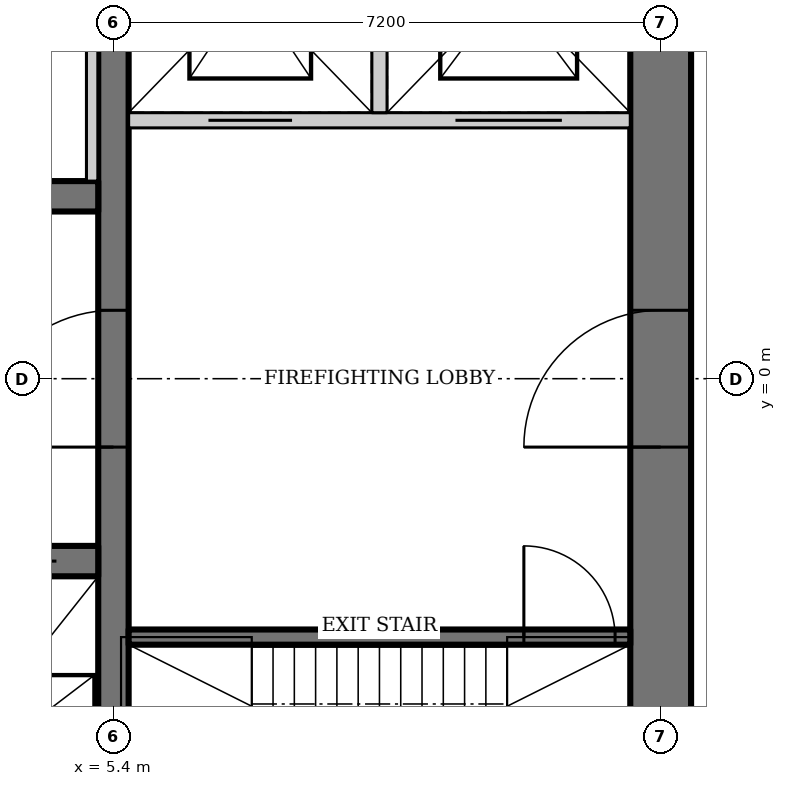
"""IFC4 building model, lengths in metres.
Left out: names, types, materials, properties, quantities, classifications, styles, units other than length and angle.
Written with IfcOpenShell. Run it as: python <this file> out.ifc"""

import sys

from ifc_helpers import new_model, si_unit, direction, frame, frame_2d, origin, place, context, subcontext, project, spatial, rectangle, extrude, element, fill, save


model = new_model("IFC4")
c1 = context("Model", 3, precision=1e-05, world=origin(), true_north=direction((0.0, 1.0)))
c2 = subcontext(c1, "Body", "Model", "MODEL_VIEW")
j1 = project(units=[si_unit("LENGTHUNIT", "METRE"), si_unit("PLANEANGLEUNIT", "RADIAN")], contexts=[c1])
p1 = place(None, origin())
s1 = spatial("IfcSite", under=j1, at=p1, CompositionType="ELEMENT")
p2 = place(p1, origin())
s2 = spatial("IfcBuilding", under=s1, at=p2, CompositionType="ELEMENT")
p3 = place(p2, frame((0.0, 0.0, 274.9)))
s3 = spatial("IfcBuildingStorey", under=s2, at=p3, CompositionType="ELEMENT", Elevation=274.9)
p4 = place(p3, frame((12.6, -11.0, 0.0), z_axis=(0.0, 0.0, 1.0), x_axis=(0.0, 1.0, 0.0)))
e1 = element("IfcWall", 1, at=p4, inside=s3, PredefinedType="SHEAR", context=c2, shape_type="SweptSolid", body=[
    extrude(rectangle(XDim=22.0, YDim=0.8, at=frame_2d((11.0, 0.0))), origin(), (0.0, 0.0, 1.0), 4.5),
])
p5 = place(p4, frame((10.1, 0.0, 0.0)))
e2 = element("IfcOpeningElement", 2, at=p5, cuts=e1, PredefinedType="OPENING", context=c2, shape_type="SweptSolid", body=[
    extrude(rectangle(XDim=1.8, YDim=2.1, at=frame_2d((0.9, 1.05))), frame((0.0, 0.41, 0.0), z_axis=(0.0, -1.0, 0.0), x_axis=(1.0, 0.0, 0.0)), (0.0, 0.0, 1.0), 0.82),
])
p6 = place(p3, frame((5.4, -6.8, 0.0), z_axis=(0.0, 0.0, 1.0), x_axis=(0.0, 1.0, 0.0)))
e3 = element("IfcWall", 3, at=p6, inside=s3, PredefinedType="SHEAR", context=c2, shape_type="SweptSolid", body=[
    extrude(rectangle(XDim=14.6, YDim=0.4, at=frame_2d((7.3, 0.0))), origin(), (0.0, 0.0, 1.0), 4.5),
])
p7 = place(p6, frame((5.9, 0.0, 0.0)))
e4 = element("IfcOpeningElement", 4, at=p7, cuts=e3, PredefinedType="OPENING", context=c2, shape_type="SweptSolid", body=[
    extrude(rectangle(XDim=1.8, YDim=2.1, at=frame_2d((0.9, 1.05))), frame((0.0, 0.21, 0.0), z_axis=(0.0, -1.0, 0.0), x_axis=(1.0, 0.0, 0.0)), (0.0, 0.0, 1.0), 0.42),
])
p8 = place(p3, frame((-5.2, -2.4, 0.0), z_axis=(0.0, 0.0, 1.0), x_axis=(1.0, 0.0, 0.0)))
e5 = element("IfcWall", 5, at=p8, inside=s3, PredefinedType="SHEAR", context=c2, shape_type="SweptSolid", body=[
    extrude(rectangle(XDim=10.4, YDim=0.4, at=frame_2d((5.2, 0.0))), origin(), (0.0, 0.0, 1.0), 4.5),
])
p9 = place(p8, frame((1.683, 0.0, 0.0)))
e6 = element("IfcOpeningElement", 6, at=p9, cuts=e5, PredefinedType="OPENING", context=c2, shape_type="SweptSolid", body=[
    extrude(rectangle(XDim=1.1, YDim=2.2, at=frame_2d((0.55, 1.1))), frame((0.0, 0.21, 0.0), z_axis=(0.0, -1.0, 0.0), x_axis=(1.0, 0.0, 0.0)), (0.0, 0.0, 1.0), 0.42),
])
p10 = place(p8, frame((5.217, 0.0, 0.0)))
e7 = element("IfcOpeningElement", 7, at=p10, cuts=e5, PredefinedType="OPENING", context=c2, shape_type="SweptSolid", body=[
    extrude(rectangle(XDim=1.1, YDim=2.2, at=frame_2d((0.55, 1.1))), frame((0.0, 0.21, 0.0), z_axis=(0.0, -1.0, 0.0), x_axis=(1.0, 0.0, 0.0)), (0.0, 0.0, 1.0), 0.42),
])
p11 = place(p8, frame((8.75, 0.0, 0.0)))
e8 = element("IfcOpeningElement", 8, at=p11, cuts=e5, PredefinedType="OPENING", context=c2, shape_type="SweptSolid", body=[
    extrude(rectangle(XDim=1.1, YDim=2.2, at=frame_2d((0.55, 1.1))), frame((0.0, 0.21, 0.0), z_axis=(0.0, -1.0, 0.0), x_axis=(1.0, 0.0, 0.0)), (0.0, 0.0, 1.0), 0.42),
])
p12 = place(p3, frame((5.2, 2.4, 0.0), z_axis=(0.0, 0.0, 1.0), x_axis=(-1.0, 0.0, 0.0)))
e9 = element("IfcWall", 9, at=p12, inside=s3, PredefinedType="SHEAR", context=c2, shape_type="SweptSolid", body=[
    extrude(rectangle(XDim=10.4, YDim=0.4, at=frame_2d((5.2, 0.0))), origin(), (0.0, 0.0, 1.0), 4.5),
])
p13 = place(p3, frame((5.6, -3.4, 0.0), z_axis=(0.0, 0.0, 1.0), x_axis=(1.0, 0.0, 0.0)))
e10 = element("IfcWall", 10, at=p13, inside=s3, PredefinedType="SHEAR", context=c2, shape_type="SweptSolid", body=[
    extrude(rectangle(XDim=6.6, YDim=0.2, at=frame_2d((3.3, 0.0))), origin(), (0.0, 0.0, 1.0), 4.5),
])
p14 = place(p13, frame((5.2, 0.0, 0.0)))
e11 = element("IfcOpeningElement", 11, at=p14, cuts=e10, PredefinedType="OPENING", context=c2, shape_type="SweptSolid", body=[
    extrude(rectangle(XDim=1.2, YDim=2.1, at=frame_2d((0.6, 1.05))), frame((0.0, 0.11, 0.0), z_axis=(0.0, -1.0, 0.0), x_axis=(1.0, 0.0, 0.0)), (0.0, 0.0, 1.0), 0.22),
])
p15 = place(p3, frame((12.2, 3.4, 0.0), z_axis=(0.0, 0.0, 1.0), x_axis=(-1.0, 0.0, 0.0)))
e12 = element("IfcWall", 12, at=p15, inside=s3, PredefinedType="SOLIDWALL", context=c2, shape_type="SweptSolid", body=[
    extrude(rectangle(XDim=6.6, YDim=0.2, at=frame_2d((3.3, 0.0))), origin(), (0.0, 0.0, 1.0), 4.5),
])
p16 = place(p15, frame((4.45, 0.0, 0.0)))
e13 = element("IfcOpeningElement", 13, at=p16, cuts=e12, PredefinedType="OPENING", context=c2, shape_type="SweptSolid", body=[
    extrude(rectangle(XDim=1.1, YDim=2.2, at=frame_2d((0.55, 1.1))), frame((0.0, 0.11, 0.0), z_axis=(0.0, -1.0, 0.0), x_axis=(1.0, 0.0, 0.0)), (0.0, 0.0, 1.0), 0.22),
])
p17 = place(p15, frame((0.9, 0.0, 0.0)))
e14 = element("IfcOpeningElement", 14, at=p17, cuts=e12, PredefinedType="OPENING", context=c2, shape_type="SweptSolid", body=[
    extrude(rectangle(XDim=1.4, YDim=2.2, at=frame_2d((0.7, 1.1))), frame((0.0, 0.11, 0.0), z_axis=(0.0, -1.0, 0.0), x_axis=(1.0, 0.0, 0.0)), (0.0, 0.0, 1.0), 0.22),
])
p18 = place(p3, frame((8.9, 3.5, 0.0), z_axis=(0.0, 0.0, 1.0), x_axis=(0.0, 1.0, 0.0)))
e15 = element("IfcWall", 15, at=p18, inside=s3, PredefinedType="SOLIDWALL", context=c2, shape_type="SweptSolid", body=[
    extrude(rectangle(XDim=3.3, YDim=0.2, at=frame_2d((1.65, 0.0))), origin(), (0.0, 0.0, 1.0), 4.5),
])
p19 = place(p3, frame((5.12, 2.6, 0.0), z_axis=(0.0, 0.0, 1.0), x_axis=(0.0, 1.0, 0.0)))
e16 = element("IfcWall", 16, at=p19, inside=s3, PredefinedType="PARTITIONING", context=c2, shape_type="SweptSolid", body=[
    extrude(rectangle(XDim=5.2, YDim=0.15, at=frame_2d((2.6, 0.0))), origin(), (0.0, 0.0, 1.0), 4.35),
])
p20 = place(p7, origin())
e17 = element("IfcDoor", 17, at=p20, inside=s3, OperationType="DOUBLE_DOOR_DOUBLE_SWING", PredefinedType="DOOR", context=c2, shape_type="SweptSolid", body=[
    extrude(rectangle(XDim=1.8, YDim=2.1, at=frame_2d((0.9, 1.05))), frame((0.0, 0.025, 0.0), z_axis=(0.0, -1.0, 0.0), x_axis=(1.0, 0.0, 0.0)), (0.0, 0.0, 1.0), 0.05),
])
fill(e4, e17)
p21 = place(p14, origin())
e18 = element("IfcDoor", 18, at=p21, inside=s3, OperationType="SINGLE_SWING_RIGHT", PredefinedType="DOOR", context=c2, shape_type="SweptSolid", body=[
    extrude(rectangle(XDim=1.2, YDim=2.1, at=frame_2d((0.6, 1.05))), frame((0.0, 0.025, 0.0), z_axis=(0.0, -1.0, 0.0), x_axis=(1.0, 0.0, 0.0)), (0.0, 0.0, 1.0), 0.05),
])
fill(e11, e18)
p22 = place(p5, origin())
e19 = element("IfcDoor", 19, at=p22, inside=s3, OperationType="DOUBLE_DOOR_DOUBLE_SWING", PredefinedType="DOOR", context=c2, shape_type="SweptSolid", body=[
    extrude(rectangle(XDim=1.8, YDim=2.1, at=frame_2d((0.9, 1.05))), frame((0.0, 0.025, 0.0), z_axis=(0.0, -1.0, 0.0), x_axis=(1.0, 0.0, 0.0)), (0.0, 0.0, 1.0), 0.05),
])
fill(e2, e19)
p23 = place(p11, origin())
e20 = element("IfcDoor", 20, at=p23, inside=s3, OperationType="DOUBLE_DOOR_SLIDING", PredefinedType="DOOR", context=c2, shape_type="SweptSolid", body=[
    extrude(rectangle(XDim=1.1, YDim=2.2, at=frame_2d((0.55, 1.1))), frame((0.0, 0.025, 0.0), z_axis=(0.0, -1.0, 0.0), x_axis=(1.0, 0.0, 0.0)), (0.0, 0.0, 1.0), 0.05),
])
fill(e8, e20)
p24 = place(p16, origin())
e21 = element("IfcDoor", 21, at=p24, inside=s3, OperationType="DOUBLE_DOOR_SLIDING", PredefinedType="DOOR", context=c2, shape_type="SweptSolid", body=[
    extrude(rectangle(XDim=1.1, YDim=2.2, at=frame_2d((0.55, 1.1))), frame((0.0, 0.025, 0.0), z_axis=(0.0, -1.0, 0.0), x_axis=(1.0, 0.0, 0.0)), (0.0, 0.0, 1.0), 0.05),
])
fill(e13, e21)
p25 = place(p17, origin())
e22 = element("IfcDoor", 22, at=p25, inside=s3, OperationType="DOUBLE_DOOR_SLIDING", PredefinedType="DOOR", context=c2, shape_type="SweptSolid", body=[
    extrude(rectangle(XDim=1.4, YDim=2.2, at=frame_2d((0.7, 1.1))), frame((0.0, 0.025, 0.0), z_axis=(0.0, -1.0, 0.0), x_axis=(1.0, 0.0, 0.0)), (0.0, 0.0, 1.0), 0.05),
])
fill(e14, e22)
save(model, sys.argv[1])
